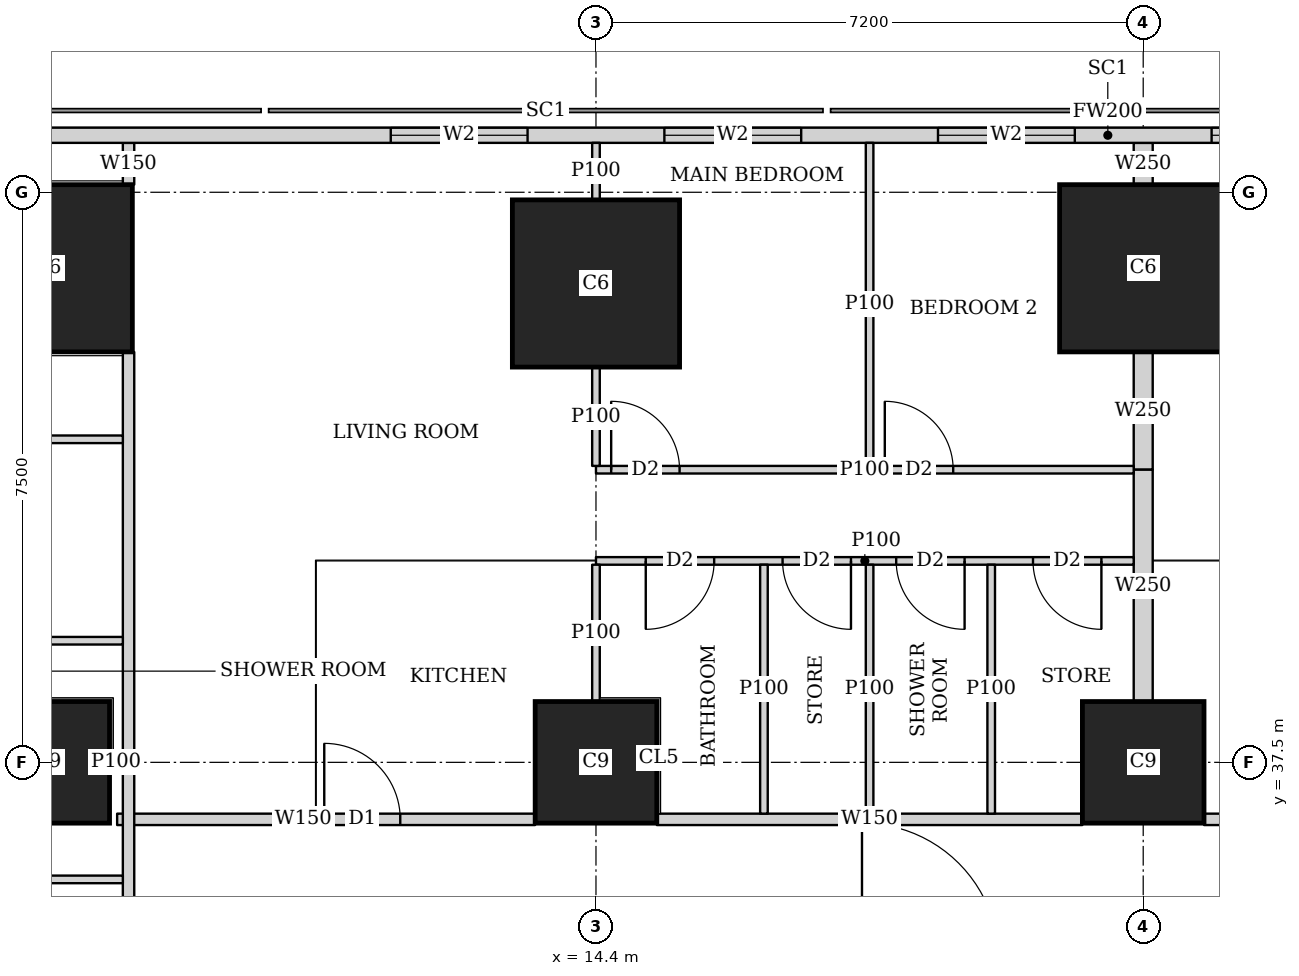
"""IFC4 building model, lengths in metres.
Left out: names, types, materials, properties, quantities, classifications, styles, units other than length and angle.
Written with IfcOpenShell. Run it as: python <this file> out.ifc"""

import sys

from ifc_helpers import new_model, si_unit, direction, frame, frame_2d, origin, origin_2d, place, context, subcontext, project, spatial, rectangle, extrude, element, fill, save


model = new_model("IFC4")
c1 = context("Model", 3, precision=1e-05, world=origin(), true_north=direction((0.0, 1.0)))
c2 = subcontext(c1, "Body", "Model", "MODEL_VIEW")
j1 = project(units=[si_unit("LENGTHUNIT", "METRE"), si_unit("PLANEANGLEUNIT", "RADIAN")], contexts=[c1])
p1 = place(None, origin())
s1 = spatial("IfcSite", under=j1, at=p1, CompositionType="ELEMENT")
p2 = place(p1, origin())
s2 = spatial("IfcBuilding", under=s1, at=p2, CompositionType="ELEMENT")
p3 = place(p2, frame((0.0, 0.0, 122.9)))
s3 = spatial("IfcBuildingStorey", under=s2, at=p3, CompositionType="ELEMENT", Elevation=122.9)
for number, where, z_axis, x_axis in (
    (1, (7.2, 37.5, 0.0), (0.0, 0.0, 1.0), (1.0, 0.0, 0.0)),
    (2, (14.4, 37.5, 0.0), (0.0, 0.0, 1.0), (1.0, 0.0, 0.0)),
    (3, (21.6, 37.5, 0.0), (0.0, 0.0, 1.0), (1.0, 0.0, 0.0)),
):
    element("IfcColumn", number, at=place(p3, frame(where, z_axis=z_axis, x_axis=x_axis)), inside=s3, PredefinedType="COLUMN", context=c2, shape_type="SweptSolid", body=[
        extrude(rectangle(XDim=1.6, YDim=1.6, at=origin_2d()), origin(), (0.0, 0.0, 1.0), 3.75),
    ])
for number, where, z_axis, x_axis in (
    (4, (7.2, 44.0, 0.0), (0.0, 0.0, 1.0), (1.0, 0.0, 0.0)),
    (5, (14.4, 43.8, 0.0), (0.0, 0.0, 1.0), (1.0, 0.0, 0.0)),
    (6, (21.6, 44.0, 0.0), (0.0, 0.0, 1.0), (1.0, 0.0, 0.0)),
):
    element("IfcColumn", number, at=place(p3, frame(where, z_axis=z_axis, x_axis=x_axis)), inside=s3, PredefinedType="COLUMN", context=c2, shape_type="SweptSolid", body=[
        extrude(rectangle(XDim=2.2, YDim=2.2, at=origin_2d()), origin(), (0.0, 0.0, 1.0), 3.75),
    ])
p4 = place(p3, frame((40.106, 45.75, 0.0), z_axis=(0.0, 0.0, 1.0), x_axis=(-1.0, 0.0, 0.0)))
e7 = element("IfcWall", 7, at=p4, inside=s3, PredefinedType="SOLIDWALL", context=c2, shape_type="SweptSolid", body=[
    extrude(rectangle(XDim=37.943, YDim=0.2, at=frame_2d((18.971, 0.0))), origin(), (0.0, 0.0, 1.0), 3.5),
])
p5 = place(p4, frame((8.606, 0.0, 0.9)))
e8 = element("IfcOpeningElement", 8, at=p5, cuts=e7, PredefinedType="OPENING", context=c2, shape_type="SweptSolid", body=[
    extrude(rectangle(XDim=1.8, YDim=1.5, at=frame_2d((0.9, 0.75))), frame((0.0, 0.11, 0.0), z_axis=(0.0, -1.0, 0.0), x_axis=(1.0, 0.0, 0.0)), (0.0, 0.0, 1.0), 0.22),
])
p6 = place(p4, frame((12.206, 0.0, 0.9)))
e9 = element("IfcOpeningElement", 9, at=p6, cuts=e7, PredefinedType="OPENING", context=c2, shape_type="SweptSolid", body=[
    extrude(rectangle(XDim=1.8, YDim=1.5, at=frame_2d((0.9, 0.75))), frame((0.0, 0.11, 0.0), z_axis=(0.0, -1.0, 0.0), x_axis=(1.0, 0.0, 0.0)), (0.0, 0.0, 1.0), 0.22),
])
p7 = place(p4, frame((15.806, 0.0, 0.9)))
e10 = element("IfcOpeningElement", 10, at=p7, cuts=e7, PredefinedType="OPENING", context=c2, shape_type="SweptSolid", body=[
    extrude(rectangle(XDim=1.8, YDim=1.5, at=frame_2d((0.9, 0.75))), frame((0.0, 0.11, 0.0), z_axis=(0.0, -1.0, 0.0), x_axis=(1.0, 0.0, 0.0)), (0.0, 0.0, 1.0), 0.22),
])
p8 = place(p4, frame((19.406, 0.0, 0.9)))
e11 = element("IfcOpeningElement", 11, at=p8, cuts=e7, PredefinedType="OPENING", context=c2, shape_type="SweptSolid", body=[
    extrude(rectangle(XDim=1.8, YDim=1.5, at=frame_2d((0.9, 0.75))), frame((0.0, 0.11, 0.0), z_axis=(0.0, -1.0, 0.0), x_axis=(1.0, 0.0, 0.0)), (0.0, 0.0, 1.0), 0.22),
])
p9 = place(p4, frame((23.006, 0.0, 0.9)))
e12 = element("IfcOpeningElement", 12, at=p9, cuts=e7, PredefinedType="OPENING", context=c2, shape_type="SweptSolid", body=[
    extrude(rectangle(XDim=1.8, YDim=1.5, at=frame_2d((0.9, 0.75))), frame((0.0, 0.11, 0.0), z_axis=(0.0, -1.0, 0.0), x_axis=(1.0, 0.0, 0.0)), (0.0, 0.0, 1.0), 0.22),
])
p10 = place(p4, frame((26.606, 0.0, 0.9)))
e13 = element("IfcOpeningElement", 13, at=p10, cuts=e7, PredefinedType="OPENING", context=c2, shape_type="SweptSolid", body=[
    extrude(rectangle(XDim=1.8, YDim=1.5, at=frame_2d((0.9, 0.75))), frame((0.0, 0.11, 0.0), z_axis=(0.0, -1.0, 0.0), x_axis=(1.0, 0.0, 0.0)), (0.0, 0.0, 1.0), 0.22),
])
p11 = place(p3, frame((8.25, 2.126, 0.0), z_axis=(0.0, 0.0, 1.0), x_axis=(0.0, 1.0, 0.0)))
e14 = element("IfcWall", 14, at=p11, inside=s3, PredefinedType="SOLIDWALL", context=c2, shape_type="SweptSolid", body=[
    extrude(rectangle(XDim=40.773, YDim=0.15, at=frame_2d((20.386, 0.0))), origin(), (0.0, 0.0, 1.0), 3.5),
])
p12 = place(p11, frame((10.286, 0.0, 0.0)))
e15 = element("IfcOpeningElement", 15, at=p12, cuts=e14, PredefinedType="OPENING", context=c2, shape_type="SweptSolid", body=[
    extrude(rectangle(XDim=1.0, YDim=2.1, at=frame_2d((0.5, 1.05))), frame((0.0, 0.085, 0.0), z_axis=(0.0, -1.0, 0.0), x_axis=(1.0, 0.0, 0.0)), (0.0, 0.0, 1.0), 0.17),
])
p13 = place(p11, frame((14.461, 0.0, 0.0)))
e16 = element("IfcOpeningElement", 16, at=p13, cuts=e14, PredefinedType="OPENING", context=c2, shape_type="SweptSolid", body=[
    extrude(rectangle(XDim=1.0, YDim=2.1, at=frame_2d((0.5, 1.05))), frame((0.0, 0.085, 0.0), z_axis=(0.0, -1.0, 0.0), x_axis=(1.0, 0.0, 0.0)), (0.0, 0.0, 1.0), 0.17),
])
p14 = place(p11, frame((21.962, 0.0, 0.0)))
e17 = element("IfcOpeningElement", 17, at=p14, cuts=e14, PredefinedType="OPENING", context=c2, shape_type="SweptSolid", body=[
    extrude(rectangle(XDim=1.0, YDim=2.1, at=frame_2d((0.5, 1.05))), frame((0.0, 0.085, 0.0), z_axis=(0.0, -1.0, 0.0), x_axis=(1.0, 0.0, 0.0)), (0.0, 0.0, 1.0), 0.17),
])
p15 = place(p11, frame((29.461, 0.0, 0.0)))
e18 = element("IfcOpeningElement", 18, at=p15, cuts=e14, PredefinedType="OPENING", context=c2, shape_type="SweptSolid", body=[
    extrude(rectangle(XDim=1.0, YDim=2.1, at=frame_2d((0.5, 1.05))), frame((0.0, 0.085, 0.0), z_axis=(0.0, -1.0, 0.0), x_axis=(1.0, 0.0, 0.0)), (0.0, 0.0, 1.0), 0.17),
])
p16 = place(p3, frame((8.25, 45.101, 0.0), z_axis=(0.0, 0.0, 1.0), x_axis=(0.0, 1.0, 0.0)))
e19 = element("IfcWall", 19, at=p16, inside=s3, PredefinedType="SOLIDWALL", context=c2, shape_type="SweptSolid", body=[
    extrude(rectangle(XDim=0.549, YDim=0.15, at=frame_2d((0.274, 0.0))), origin(), (0.0, 0.0, 1.0), 3.5),
])
p17 = place(p3, frame((8.1, 36.75, 0.0), z_axis=(0.0, 0.0, 1.0), x_axis=(1.0, 0.0, 0.0)))
e20 = element("IfcWall", 20, at=p17, inside=s3, PredefinedType="SOLIDWALL", context=c2, shape_type="SweptSolid", body=[
    extrude(rectangle(XDim=5.499, YDim=0.15, at=frame_2d((2.75, 0.0))), origin(), (0.0, 0.0, 1.0), 3.5),
])
p18 = place(p17, frame((2.725, 0.0, 0.0)))
e21 = element("IfcOpeningElement", 21, at=p18, cuts=e20, PredefinedType="OPENING", context=c2, shape_type="SweptSolid", body=[
    extrude(rectangle(XDim=1.0, YDim=2.1, at=frame_2d((0.5, 1.05))), frame((0.0, 0.085, 0.0), z_axis=(0.0, -1.0, 0.0), x_axis=(1.0, 0.0, 0.0)), (0.0, 0.0, 1.0), 0.17),
])
p19 = place(p3, frame((15.201, 36.75, 0.0), z_axis=(0.0, 0.0, 1.0), x_axis=(1.0, 0.0, 0.0)))
e22 = element("IfcWall", 22, at=p19, inside=s3, PredefinedType="SOLIDWALL", context=c2, shape_type="SweptSolid", body=[
    extrude(rectangle(XDim=5.598, YDim=0.15, at=frame_2d((2.799, 0.0))), origin(), (0.0, 0.0, 1.0), 3.5),
])
p20 = place(p3, frame((22.401, 36.75, 0.0), z_axis=(0.0, 0.0, 1.0), x_axis=(1.0, 0.0, 0.0)))
e23 = element("IfcWall", 23, at=p20, inside=s3, PredefinedType="SOLIDWALL", context=c2, shape_type="SweptSolid", body=[
    extrude(rectangle(XDim=5.598, YDim=0.15, at=frame_2d((2.799, 0.0))), origin(), (0.0, 0.0, 1.0), 3.5),
])
p21 = place(p20, frame((0.699, 0.0, 0.0)))
e24 = element("IfcOpeningElement", 24, at=p21, cuts=e23, PredefinedType="OPENING", context=c2, shape_type="SweptSolid", body=[
    extrude(rectangle(XDim=1.0, YDim=2.1, at=frame_2d((0.5, 1.05))), frame((0.0, 0.085, 0.0), z_axis=(0.0, -1.0, 0.0), x_axis=(1.0, 0.0, 0.0)), (0.0, 0.0, 1.0), 0.17),
])
p22 = place(p3, frame((8.001, 37.5, 0.0), z_axis=(0.0, 0.0, 1.0), x_axis=(1.0, 0.0, 0.0)))
e25 = element("IfcWall", 25, at=p22, inside=s3, PredefinedType="PARTITIONING", context=c2, shape_type="SweptSolid", body=[
    extrude(rectangle(XDim=0.174, YDim=0.1, at=frame_2d((0.087, 0.0))), origin(), (0.0, 0.0, 1.0), 3.5),
])
for number, where, z_axis, x_axis in (
    (26, (4.9, 35.96, 0.0), (0.0, 0.0, 1.0), (1.0, 0.0, 0.0)),
    (27, (4.9, 39.1, 0.0), (0.0, 0.0, 1.0), (1.0, 0.0, 0.0)),
):
    element("IfcWall", number, at=place(p3, frame(where, z_axis=z_axis, x_axis=x_axis)), inside=s3, PredefinedType="PARTITIONING", context=c2, shape_type="SweptSolid", body=[
        extrude(rectangle(XDim=3.275, YDim=0.1, at=frame_2d((1.638, 0.0))), origin(), (0.0, 0.0, 1.0), 3.5),
    ])
p23 = place(p3, frame((14.4, 41.35, 0.0), z_axis=(0.0, 0.0, 1.0), x_axis=(1.0, 0.0, 0.0)))
e28 = element("IfcWall", 28, at=p23, inside=s3, PredefinedType="PARTITIONING", context=c2, shape_type="SweptSolid", body=[
    extrude(rectangle(XDim=7.075, YDim=0.1, at=frame_2d((3.538, 0.0))), origin(), (0.0, 0.0, 1.0), 3.5),
])
p24 = place(p23, frame((0.2, 0.0, 0.0)))
e29 = element("IfcOpeningElement", 29, at=p24, cuts=e28, PredefinedType="OPENING", context=c2, shape_type="SweptSolid", body=[
    extrude(rectangle(XDim=0.9, YDim=2.1, at=frame_2d((0.45, 1.05))), frame((0.0, 0.06, 0.0), z_axis=(0.0, -1.0, 0.0), x_axis=(1.0, 0.0, 0.0)), (0.0, 0.0, 1.0), 0.12),
])
p25 = place(p23, frame((3.8, 0.0, 0.0)))
e30 = element("IfcOpeningElement", 30, at=p25, cuts=e28, PredefinedType="OPENING", context=c2, shape_type="SweptSolid", body=[
    extrude(rectangle(XDim=0.9, YDim=2.1, at=frame_2d((0.45, 1.05))), frame((0.0, 0.06, 0.0), z_axis=(0.0, -1.0, 0.0), x_axis=(1.0, 0.0, 0.0)), (0.0, 0.0, 1.0), 0.12),
])
p26 = place(p3, frame((14.4, 40.15, 0.0), z_axis=(0.0, 0.0, 1.0), x_axis=(1.0, 0.0, 0.0)))
e31 = element("IfcWall", 31, at=p26, inside=s3, PredefinedType="PARTITIONING", context=c2, shape_type="SweptSolid", body=[
    extrude(rectangle(XDim=7.075, YDim=0.1, at=frame_2d((3.538, 0.0))), origin(), (0.0, 0.0, 1.0), 3.5),
])
p27 = place(p26, frame((0.655, 0.0, 0.0)))
e32 = element("IfcOpeningElement", 32, at=p27, cuts=e31, PredefinedType="OPENING", context=c2, shape_type="SweptSolid", body=[
    extrude(rectangle(XDim=0.9, YDim=2.1, at=frame_2d((0.45, 1.05))), frame((0.0, 0.06, 0.0), z_axis=(0.0, -1.0, 0.0), x_axis=(1.0, 0.0, 0.0)), (0.0, 0.0, 1.0), 0.12),
])
p28 = place(p26, frame((3.95, 0.0, 0.0)))
e33 = element("IfcOpeningElement", 33, at=p28, cuts=e31, PredefinedType="OPENING", context=c2, shape_type="SweptSolid", body=[
    extrude(rectangle(XDim=0.9, YDim=2.1, at=frame_2d((0.45, 1.05))), frame((0.0, 0.06, 0.0), z_axis=(0.0, -1.0, 0.0), x_axis=(1.0, 0.0, 0.0)), (0.0, 0.0, 1.0), 0.12),
])
p29 = place(p26, frame((2.455, 0.0, 0.0)))
e34 = element("IfcOpeningElement", 34, at=p29, cuts=e31, PredefinedType="OPENING", context=c2, shape_type="SweptSolid", body=[
    extrude(rectangle(XDim=0.9, YDim=2.1, at=frame_2d((0.45, 1.05))), frame((0.0, 0.06, 0.0), z_axis=(0.0, -1.0, 0.0), x_axis=(1.0, 0.0, 0.0)), (0.0, 0.0, 1.0), 0.12),
])
p30 = place(p26, frame((5.75, 0.0, 0.0)))
e35 = element("IfcOpeningElement", 35, at=p30, cuts=e31, PredefinedType="OPENING", context=c2, shape_type="SweptSolid", body=[
    extrude(rectangle(XDim=0.9, YDim=2.1, at=frame_2d((0.45, 1.05))), frame((0.0, 0.06, 0.0), z_axis=(0.0, -1.0, 0.0), x_axis=(1.0, 0.0, 0.0)), (0.0, 0.0, 1.0), 0.12),
])
p31 = place(p3, frame((14.4, 41.4, 0.0), z_axis=(0.0, 0.0, 1.0), x_axis=(0.0, 1.0, 0.0)))
e36 = element("IfcWall", 36, at=p31, inside=s3, PredefinedType="PARTITIONING", context=c2, shape_type="SweptSolid", body=[
    extrude(rectangle(XDim=1.299, YDim=0.1, at=frame_2d((0.649, 0.0))), origin(), (0.0, 0.0, 1.0), 3.5),
])
p32 = place(p3, frame((14.4, 44.901, 0.0), z_axis=(0.0, 0.0, 1.0), x_axis=(0.0, 1.0, 0.0)))
e37 = element("IfcWall", 37, at=p32, inside=s3, PredefinedType="PARTITIONING", context=c2, shape_type="SweptSolid", body=[
    extrude(rectangle(XDim=0.749, YDim=0.1, at=frame_2d((0.375, 0.0))), origin(), (0.0, 0.0, 1.0), 3.5),
])
p33 = place(p3, frame((18.0, 41.4, 0.0), z_axis=(0.0, 0.0, 1.0), x_axis=(0.0, 1.0, 0.0)))
e38 = element("IfcWall", 38, at=p33, inside=s3, PredefinedType="PARTITIONING", context=c2, shape_type="SweptSolid", body=[
    extrude(rectangle(XDim=4.25, YDim=0.1, at=frame_2d((2.125, 0.0))), origin(), (0.0, 0.0, 1.0), 2.2),
])
p34 = place(p3, frame((14.4, 38.301, 0.0), z_axis=(0.0, 0.0, 1.0), x_axis=(0.0, 1.0, 0.0)))
e39 = element("IfcWall", 39, at=p34, inside=s3, PredefinedType="PARTITIONING", context=c2, shape_type="SweptSolid", body=[
    extrude(rectangle(XDim=1.799, YDim=0.1, at=frame_2d((0.899, 0.0))), origin(), (0.0, 0.0, 1.0), 3.5),
])
for number, where, z_axis, x_axis in (
    (40, (18.0, 36.825, 0.0), (0.0, 0.0, 1.0), (0.0, 1.0, 0.0)),
    (41, (16.61, 36.825, 0.0), (0.0, 0.0, 1.0), (0.0, 1.0, 0.0)),
    (42, (19.6, 36.825, 0.0), (0.0, 0.0, 1.0), (0.0, 1.0, 0.0)),
):
    element("IfcWall", number, at=place(p3, frame(where, z_axis=z_axis, x_axis=x_axis)), inside=s3, PredefinedType="PARTITIONING", context=c2, shape_type="SweptSolid", body=[
        extrude(rectangle(XDim=3.275, YDim=0.1, at=frame_2d((1.638, 0.0))), origin(), (0.0, 0.0, 1.0), 3.5),
    ])
p35 = place(p3, frame((21.6, 41.35, 0.0), z_axis=(0.0, 0.0, 1.0), x_axis=(0.0, 1.0, 0.0)))
e43 = element("IfcWall", 43, at=p35, inside=s3, PredefinedType="SOLIDWALL", context=c2, shape_type="SweptSolid", body=[
    extrude(rectangle(XDim=1.549, YDim=0.25, at=frame_2d((0.774, 0.0))), origin(), (0.0, 0.0, 1.0), 3.5),
])
p36 = place(p3, frame((21.6, 45.101, 0.0), z_axis=(0.0, 0.0, 1.0), x_axis=(0.0, 1.0, 0.0)))
e44 = element("IfcWall", 44, at=p36, inside=s3, PredefinedType="SOLIDWALL", context=c2, shape_type="SweptSolid", body=[
    extrude(rectangle(XDim=0.549, YDim=0.25, at=frame_2d((0.274, 0.0))), origin(), (0.0, 0.0, 1.0), 3.5),
])
p37 = place(p3, frame((21.6, 38.301, 0.0), z_axis=(0.0, 0.0, 1.0), x_axis=(0.0, 1.0, 0.0)))
e45 = element("IfcWall", 45, at=p37, inside=s3, PredefinedType="SOLIDWALL", context=c2, shape_type="SweptSolid", body=[
    extrude(rectangle(XDim=3.049, YDim=0.25, at=frame_2d((1.524, 0.0))), origin(), (0.0, 0.0, 1.0), 3.5),
])
p38 = place(p3, frame((8.175, 41.75, 0.0), z_axis=(0.0, 0.0, 1.0), x_axis=(-1.0, 0.0, 0.0)))
e46 = element("IfcWall", 46, at=p38, inside=s3, PredefinedType="PARTITIONING", context=c2, shape_type="SweptSolid", body=[
    extrude(rectangle(XDim=3.275, YDim=0.1, at=frame_2d((1.638, 0.0))), origin(), (0.0, 0.0, 1.0), 3.5),
])
p39 = place(p38, frame((2.1, 0.0, 0.0)))
e47 = element("IfcOpeningElement", 47, at=p39, cuts=e46, PredefinedType="OPENING", context=c2, shape_type="SweptSolid", body=[
    extrude(rectangle(XDim=0.9, YDim=2.1, at=frame_2d((0.45, 1.05))), frame((0.0, 0.06, 0.0), z_axis=(0.0, -1.0, 0.0), x_axis=(1.0, 0.0, 0.0)), (0.0, 0.0, 1.0), 0.12),
])
p40 = place(p7, origin())
e48 = element("IfcWindow", 48, at=p40, inside=s3, PartitioningType="SINGLE_PANEL", PredefinedType="WINDOW", context=c2, shape_type="SweptSolid", body=[
    extrude(rectangle(XDim=1.8, YDim=1.5, at=frame_2d((0.9, 0.75))), frame((0.0, 0.03, 0.0), z_axis=(0.0, -1.0, 0.0), x_axis=(1.0, 0.0, 0.0)), (0.0, 0.0, 1.0), 0.06),
])
fill(e10, e48)
p41 = place(p8, origin())
e49 = element("IfcWindow", 49, at=p41, inside=s3, PartitioningType="SINGLE_PANEL", PredefinedType="WINDOW", context=c2, shape_type="SweptSolid", body=[
    extrude(rectangle(XDim=1.8, YDim=1.5, at=frame_2d((0.9, 0.75))), frame((0.0, 0.03, 0.0), z_axis=(0.0, -1.0, 0.0), x_axis=(1.0, 0.0, 0.0)), (0.0, 0.0, 1.0), 0.06),
])
fill(e11, e49)
p42 = place(p9, origin())
e50 = element("IfcWindow", 50, at=p42, inside=s3, PartitioningType="SINGLE_PANEL", PredefinedType="WINDOW", context=c2, shape_type="SweptSolid", body=[
    extrude(rectangle(XDim=1.8, YDim=1.5, at=frame_2d((0.9, 0.75))), frame((0.0, 0.03, 0.0), z_axis=(0.0, -1.0, 0.0), x_axis=(1.0, 0.0, 0.0)), (0.0, 0.0, 1.0), 0.06),
])
fill(e12, e50)
p43 = place(p10, origin())
e51 = element("IfcWindow", 51, at=p43, inside=s3, PartitioningType="SINGLE_PANEL", PredefinedType="WINDOW", context=c2, shape_type="SweptSolid", body=[
    extrude(rectangle(XDim=1.8, YDim=1.5, at=frame_2d((0.9, 0.75))), frame((0.0, 0.03, 0.0), z_axis=(0.0, -1.0, 0.0), x_axis=(1.0, 0.0, 0.0)), (0.0, 0.0, 1.0), 0.06),
])
fill(e13, e51)
p44 = place(p24, origin())
e52 = element("IfcDoor", 52, at=p44, inside=s3, OperationType="SINGLE_SWING_LEFT", PredefinedType="DOOR", context=c2, shape_type="SweptSolid", body=[
    extrude(rectangle(XDim=0.9, YDim=2.1, at=frame_2d((0.45, 1.05))), frame((0.0, 0.025, 0.0), z_axis=(0.0, -1.0, 0.0), x_axis=(1.0, 0.0, 0.0)), (0.0, 0.0, 1.0), 0.05),
])
fill(e29, e52)
p45 = place(p25, origin())
e53 = element("IfcDoor", 53, at=p45, inside=s3, OperationType="SINGLE_SWING_LEFT", PredefinedType="DOOR", context=c2, shape_type="SweptSolid", body=[
    extrude(rectangle(XDim=0.9, YDim=2.1, at=frame_2d((0.45, 1.05))), frame((0.0, 0.025, 0.0), z_axis=(0.0, -1.0, 0.0), x_axis=(1.0, 0.0, 0.0)), (0.0, 0.0, 1.0), 0.05),
])
fill(e30, e53)
p46 = place(p27, origin())
e54 = element("IfcDoor", 54, at=p46, inside=s3, OperationType="SINGLE_SWING_RIGHT", PredefinedType="DOOR", context=c2, shape_type="SweptSolid", body=[
    extrude(rectangle(XDim=0.9, YDim=2.1, at=frame_2d((0.45, 1.05))), frame((0.0, 0.025, 0.0), z_axis=(0.0, -1.0, 0.0), x_axis=(1.0, 0.0, 0.0)), (0.0, 0.0, 1.0), 0.05),
])
fill(e32, e54)
p47 = place(p28, origin())
e55 = element("IfcDoor", 55, at=p47, inside=s3, OperationType="SINGLE_SWING_LEFT", PredefinedType="DOOR", context=c2, shape_type="SweptSolid", body=[
    extrude(rectangle(XDim=0.9, YDim=2.1, at=frame_2d((0.45, 1.05))), frame((0.0, 0.025, 0.0), z_axis=(0.0, -1.0, 0.0), x_axis=(1.0, 0.0, 0.0)), (0.0, 0.0, 1.0), 0.05),
])
fill(e33, e55)
p48 = place(p29, origin())
e56 = element("IfcDoor", 56, at=p48, inside=s3, OperationType="SINGLE_SWING_LEFT", PredefinedType="DOOR", context=c2, shape_type="SweptSolid", body=[
    extrude(rectangle(XDim=0.9, YDim=2.1, at=frame_2d((0.45, 1.05))), frame((0.0, 0.025, 0.0), z_axis=(0.0, -1.0, 0.0), x_axis=(1.0, 0.0, 0.0)), (0.0, 0.0, 1.0), 0.05),
])
fill(e34, e56)
p49 = place(p30, origin())
e57 = element("IfcDoor", 57, at=p49, inside=s3, OperationType="SINGLE_SWING_LEFT", PredefinedType="DOOR", context=c2, shape_type="SweptSolid", body=[
    extrude(rectangle(XDim=0.9, YDim=2.1, at=frame_2d((0.45, 1.05))), frame((0.0, 0.025, 0.0), z_axis=(0.0, -1.0, 0.0), x_axis=(1.0, 0.0, 0.0)), (0.0, 0.0, 1.0), 0.05),
])
fill(e35, e57)
p50 = place(p18, origin())
e58 = element("IfcDoor", 58, at=p50, inside=s3, OperationType="SINGLE_SWING_LEFT", PredefinedType="DOOR", context=c2, shape_type="SweptSolid", body=[
    extrude(rectangle(XDim=1.0, YDim=2.1, at=frame_2d((0.5, 1.05))), frame((0.0, 0.025, 0.0), z_axis=(0.0, -1.0, 0.0), x_axis=(1.0, 0.0, 0.0)), (0.0, 0.0, 1.0), 0.05),
])
fill(e21, e58)
save(model, sys.argv[1])
